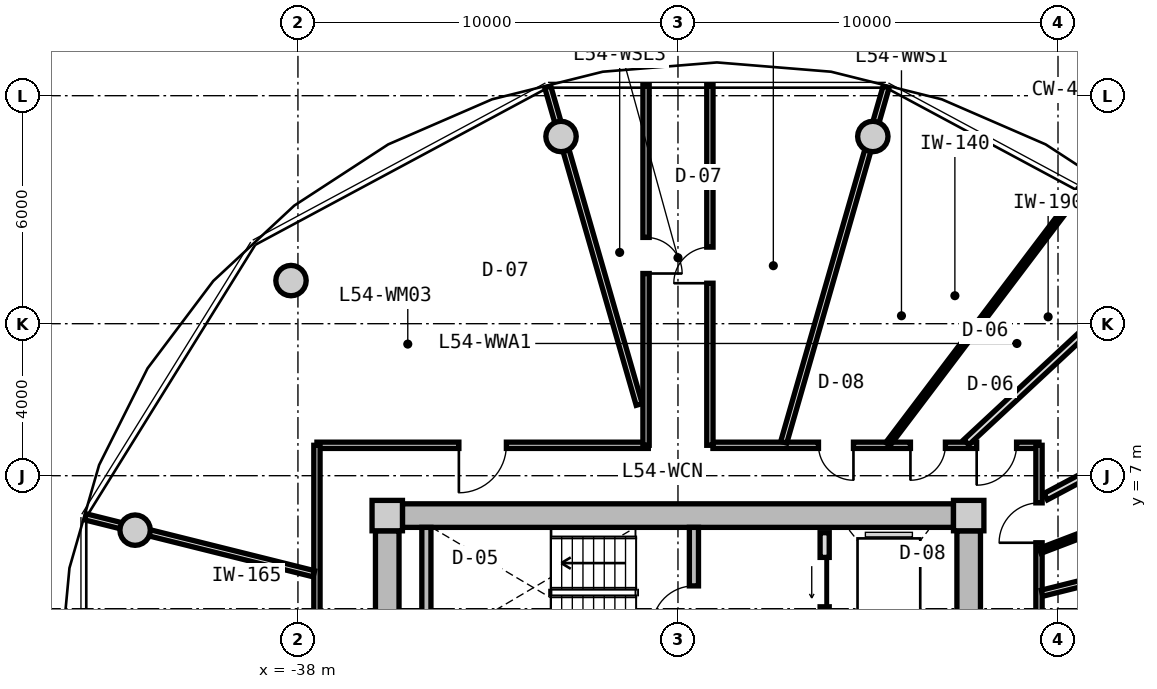
"""IFC4 building model, lengths in metres.
Left out: names, types, materials, properties, quantities, classifications, styles, units other than length and angle.
Written with IfcOpenShell. Run it as: python <this file> out.ifc"""

import sys

from ifc_helpers import new_model, si_unit, direction, frame, frame_2d, origin, origin_2d, place, context, subcontext, project, spatial, rectangle, circle, extrude, source, transform, mapped, element, fill, save


model = new_model("IFC4")
c1 = context("Model", 3, precision=1e-05, world=origin(), true_north=direction((0.0, 1.0)))
c2 = subcontext(c1, "Body", "Model", "MODEL_VIEW")
j1 = project(units=[si_unit("LENGTHUNIT", "METRE"), si_unit("PLANEANGLEUNIT", "RADIAN")], contexts=[c1])
p1 = place(None, origin())
s1 = spatial("IfcSite", under=j1, at=p1, CompositionType="ELEMENT")
p2 = place(p1, origin())
s2 = spatial("IfcBuilding", under=s1, at=p2, CompositionType="ELEMENT")
p3 = place(p2, frame((0.0, 0.0, 173.95)))
s3 = spatial("IfcBuildingStorey", under=s2, at=p3, CompositionType="ELEMENT", Elevation=173.95)
m1 = source(origin(), c2, "Body", "SweptSolid", [
    extrude(rectangle(XDim=0.8, YDim=0.8, at=origin_2d()), origin(), (0.0, 0.0, 1.0), 3.05),
])
for number, where, z_axis, x_axis in (
    (1, (-20.35, 5.95, 0.0), (0.0, 0.0, 1.0), (1.0, 0.0, 0.0)),
    (2, (-35.65, 5.95, 0.0), (0.0, 0.0, 1.0), (1.0, 0.0, 0.0)),
):
    element("IfcColumn", number, at=place(p3, frame(where, z_axis=z_axis, x_axis=x_axis)), inside=s3, PredefinedType="COLUMN", context=c2, shape_type="MappedRepresentation", body=[
        mapped(m1, transform((0.0, 0.0, 0.0), x_axis=(1.0, 0.0, 0.0), y_axis=(0.0, 1.0, 0.0), z_axis=(0.0, 0.0, 1.0), scale=1.0)),
    ])
m2 = source(origin(), c2, "Body", "SweptSolid", [
    extrude(rectangle(XDim=14.5, YDim=0.62, at=frame_2d((7.25, 0.0))), origin(), (0.0, 0.0, 1.0), 2.81),
])
p4 = place(p3, frame((-35.25, 5.95, 0.0), z_axis=(0.0, 0.0, 1.0), x_axis=(1.0, 0.0, 0.0)))
e3 = element("IfcWall", 3, at=p4, inside=s3, PredefinedType="SHEAR", context=c2, shape_type="MappedRepresentation", body=[
    mapped(m2, transform((0.0, 0.0, 0.0), x_axis=(1.0, 0.0, 0.0), y_axis=(0.0, 1.0, 0.0), z_axis=(0.0, 0.0, 1.0), scale=1.0)),
])
m3 = source(origin(), c2, "Body", "SweptSolid", [
    extrude(rectangle(XDim=11.1, YDim=0.62, at=frame_2d((5.55, 0.0))), origin(), (0.0, 0.0, 1.0), 2.81),
])
p5 = place(p3, frame((-35.65, -5.55, 0.0), z_axis=(0.0, 0.0, 1.0), x_axis=(0.0, 1.0, 0.0)))
e4 = element("IfcWall", 4, at=p5, inside=s3, PredefinedType="SHEAR", context=c2, shape_type="MappedRepresentation", body=[
    mapped(m3, transform((0.0, 0.0, 0.0), x_axis=(1.0, 0.0, 0.0), y_axis=(0.0, 1.0, 0.0), z_axis=(0.0, 0.0, 1.0), scale=1.0)),
])
p6 = place(p5, frame((3.8, 0.0, 0.0)))
e5 = element("IfcOpeningElement", 5, at=p6, cuts=e4, PredefinedType="OPENING", context=c2, shape_type="SweptSolid", body=[
    extrude(rectangle(XDim=1.2, YDim=2.15, at=frame_2d((0.6, 1.075))), frame((0.0, 0.32, 0.0), z_axis=(0.0, -1.0, 0.0), x_axis=(1.0, 0.0, 0.0)), (0.0, 0.0, 1.0), 0.64),
])
p7 = place(p3, frame((-20.35, 5.55, 0.0), z_axis=(0.0, 0.0, 1.0), x_axis=(0.0, -1.0, 0.0)))
e6 = element("IfcWall", 6, at=p7, inside=s3, PredefinedType="SHEAR", context=c2, shape_type="MappedRepresentation", body=[
    mapped(m3, transform((0.0, 0.0, 0.0), x_axis=(1.0, 0.0, 0.0), y_axis=(0.0, 1.0, 0.0), z_axis=(0.0, 0.0, 1.0), scale=1.0)),
])
p8 = place(p7, frame((5.65, 0.0, 0.0)))
e7 = element("IfcOpeningElement", 7, at=p8, cuts=e6, PredefinedType="OPENING", context=c2, shape_type="SweptSolid", body=[
    extrude(rectangle(XDim=1.2, YDim=2.15, at=frame_2d((0.6, 1.075))), frame((0.0, 0.32, 0.0), z_axis=(0.0, -1.0, 0.0), x_axis=(1.0, 0.0, 0.0)), (0.0, 0.0, 1.0), 0.64),
])
m4 = source(origin(), c2, "Body", "SweptSolid", [
    extrude(circle(Radius=0.4, at=origin_2d()), origin(), (0.0, 0.0, 1.0), 3.05),
])
for number, where, z_axis, x_axis in (
    (8, (-22.873, 15.926, 0.0), (0.0, 0.0, 1.0), (1.0, 0.0, 0.0)),
    (9, (-31.077, 15.926, 0.0), (0.0, 0.0, 1.0), (1.0, 0.0, 0.0)),
    (10, (-38.183, 12.135, 0.0), (0.0, 0.0, 1.0), (1.0, 0.0, 0.0)),
    (11, (-42.285, 5.567, 0.0), (0.0, 0.0, 1.0), (1.0, 0.0, 0.0)),
):
    element("IfcColumn", number, at=place(p3, frame(where, z_axis=z_axis, x_axis=x_axis)), inside=s3, PredefinedType="COLUMN", context=c2, shape_type="MappedRepresentation", body=[
        mapped(m4, transform((0.0, 0.0, 0.0), x_axis=(1.0, 0.0, 0.0), y_axis=(0.0, 1.0, 0.0), z_axis=(0.0, 0.0, 1.0), scale=1.0)),
    ])
m5 = source(origin(), c2, "Body", "SweptSolid", [
    extrude(rectangle(XDim=3.19, YDim=0.24, at=frame_2d((1.595, 0.0))), origin(), (0.0, 0.0, 1.0), 2.81),
])
p9 = place(p3, frame((-34.62, 2.45, 0.0), z_axis=(0.0, 0.0, 1.0), x_axis=(0.0, 1.0, 0.0)))
e12 = element("IfcWall", 12, at=p9, inside=s3, PredefinedType="PARTITIONING", context=c2, shape_type="MappedRepresentation", body=[
    mapped(m5, transform((0.0, 0.0, 0.0), x_axis=(1.0, 0.0, 0.0), y_axis=(0.0, 1.0, 0.0), z_axis=(0.0, 0.0, 1.0), scale=1.0)),
])
p10 = place(p3, frame((-27.58, 2.45, 0.0), z_axis=(0.0, 0.0, 1.0), x_axis=(0.0, 1.0, 0.0)))
e13 = element("IfcWall", 13, at=p10, inside=s3, PredefinedType="PARTITIONING", context=c2, shape_type="MappedRepresentation", body=[
    mapped(m5, transform((0.0, 0.0, 0.0), x_axis=(1.0, 0.0, 0.0), y_axis=(0.0, 1.0, 0.0), z_axis=(0.0, 0.0, 1.0), scale=1.0)),
])
p11 = place(p10, frame((0.55, 0.0, 0.0)))
e14 = element("IfcOpeningElement", 14, at=p11, cuts=e13, PredefinedType="OPENING", context=c2, shape_type="SweptSolid", body=[
    extrude(rectangle(XDim=1.1, YDim=2.15, at=frame_2d((0.55, 1.075))), frame((0.0, 0.13, 0.0), z_axis=(0.0, -1.0, 0.0), x_axis=(1.0, 0.0, 0.0)), (0.0, 0.0, 1.0), 0.26),
])
m6 = source(origin(), c2, "Body", "SweptSolid", [
    extrude(rectangle(XDim=5.0, YDim=0.24, at=frame_2d((2.5, 0.0))), origin(), (0.0, 0.0, 1.0), 2.795),
])
p12 = place(p3, frame((-24.14, 0.5, 0.0), z_axis=(0.0, 0.0, 1.0), x_axis=(0.0, 1.0, 0.0)))
e15 = element("IfcWall", 15, at=p12, inside=s3, PredefinedType="PARTITIONING", context=c2, shape_type="MappedRepresentation", body=[
    mapped(m6, transform((0.0, 0.0, 0.0), x_axis=(1.0, 0.0, 0.0), y_axis=(0.0, 1.0, 0.0), z_axis=(0.0, 0.0, 1.0), scale=1.0)),
])
p13 = place(p12, frame((3.05, 0.0, 0.0)))
e16 = element("IfcOpeningElement", 16, at=p13, cuts=e15, PredefinedType="OPENING", context=c2, shape_type="SweptSolid", body=[
    extrude(rectangle(XDim=1.3, YDim=2.2, at=frame_2d((0.65, 1.1))), frame((0.0, 0.13, 0.0), z_axis=(0.0, -1.0, 0.0), x_axis=(1.0, 0.0, 0.0)), (0.0, 0.0, 1.0), 0.26),
])
p14 = place(p12, frame((0.55, 0.0, 0.0)))
e17 = element("IfcOpeningElement", 17, at=p14, cuts=e15, PredefinedType="OPENING", context=c2, shape_type="SweptSolid", body=[
    extrude(rectangle(XDim=1.3, YDim=2.2, at=frame_2d((0.65, 1.1))), frame((0.0, 0.13, 0.0), z_axis=(0.0, -1.0, 0.0), x_axis=(1.0, 0.0, 0.0)), (0.0, 0.0, 1.0), 0.26),
])
m7 = source(origin(), c2, "Body", "SweptSolid", [
    extrude(rectangle(XDim=8.719, YDim=0.165, at=frame_2d((4.36, 0.0))), origin(), (0.0, 0.0, 1.0), 2.795),
])
p15 = place(p3, frame((-37.5, 7.8, 0.0), z_axis=(0.0, 0.0, 1.0), x_axis=(1.0, 0.0, 0.0)))
e18 = element("IfcWall", 18, at=p15, inside=s3, PredefinedType="PARTITIONING", context=c2, shape_type="MappedRepresentation", body=[
    mapped(m7, transform((0.0, 0.0, 0.0), x_axis=(1.0, 0.0, 0.0), y_axis=(0.0, 1.0, 0.0), z_axis=(0.0, 0.0, 1.0), scale=1.0)),
])
p16 = place(p15, frame((3.735, 0.0, 0.0)))
e19 = element("IfcOpeningElement", 19, at=p16, cuts=e18, PredefinedType="OPENING", context=c2, shape_type="SweptSolid", body=[
    extrude(rectangle(XDim=1.25, YDim=2.2, at=frame_2d((0.625, 1.1))), frame((0.0, 0.093, 0.0), z_axis=(0.0, -1.0, 0.0), x_axis=(1.0, 0.0, 0.0)), (0.0, 0.0, 1.0), 0.185),
])
m8 = source(origin(), c2, "Body", "SweptSolid", [
    extrude(rectangle(XDim=8.58, YDim=0.165, at=frame_2d((4.29, 0.0))), origin(), (0.0, 0.0, 1.0), 2.795),
])
p17 = place(p3, frame((-27.08, 7.8, 0.0), z_axis=(0.0, 0.0, 1.0), x_axis=(1.0, 0.0, 0.0)))
e20 = element("IfcWall", 20, at=p17, inside=s3, PredefinedType="PARTITIONING", context=c2, shape_type="MappedRepresentation", body=[
    mapped(m8, transform((0.0, 0.0, 0.0), x_axis=(1.0, 0.0, 0.0), y_axis=(0.0, 1.0, 0.0), z_axis=(0.0, 0.0, 1.0), scale=1.0)),
])
p18 = place(p17, frame((6.94, 0.0, 0.0)))
e21 = element("IfcOpeningElement", 21, at=p18, cuts=e20, PredefinedType="OPENING", context=c2, shape_type="SweptSolid", body=[
    extrude(rectangle(XDim=1.05, YDim=2.15, at=frame_2d((0.525, 1.075))), frame((0.0, 0.093, 0.0), z_axis=(0.0, -1.0, 0.0), x_axis=(1.0, 0.0, 0.0)), (0.0, 0.0, 1.0), 0.185),
])
p19 = place(p17, frame((5.197, 0.0, 0.0)))
e22 = element("IfcOpeningElement", 22, at=p19, cuts=e20, PredefinedType="OPENING", context=c2, shape_type="SweptSolid", body=[
    extrude(rectangle(XDim=0.92, YDim=2.1, at=frame_2d((0.46, 1.05))), frame((0.0, 0.093, 0.0), z_axis=(0.0, -1.0, 0.0), x_axis=(1.0, 0.0, 0.0)), (0.0, 0.0, 1.0), 0.185),
])
p20 = place(p17, frame((2.778, 0.0, 0.0)))
e23 = element("IfcOpeningElement", 23, at=p20, cuts=e20, PredefinedType="OPENING", context=c2, shape_type="SweptSolid", body=[
    extrude(rectangle(XDim=0.92, YDim=2.1, at=frame_2d((0.46, 1.05))), frame((0.0, 0.093, 0.0), z_axis=(0.0, -1.0, 0.0), x_axis=(1.0, 0.0, 0.0)), (0.0, 0.0, 1.0), 0.185),
])
m9 = source(origin(), c2, "Body", "SweptSolid", [
    extrude(rectangle(XDim=6.88, YDim=0.165, at=frame_2d((3.44, 0.0))), origin(), (0.0, 0.0, 1.0), 2.795),
])
p21 = place(p3, frame((-37.5, 0.92, 0.0), z_axis=(0.0, 0.0, 1.0), x_axis=(0.0, 1.0, 0.0)))
e24 = element("IfcWall", 24, at=p21, inside=s3, PredefinedType="PARTITIONING", context=c2, shape_type="MappedRepresentation", body=[
    mapped(m9, transform((0.0, 0.0, 0.0), x_axis=(1.0, 0.0, 0.0), y_axis=(0.0, 1.0, 0.0), z_axis=(0.0, 0.0, 1.0), scale=1.0)),
])
p22 = place(p3, frame((-18.5, 7.8, 0.0), z_axis=(0.0, 0.0, 1.0), x_axis=(0.0, -1.0, 0.0)))
e25 = element("IfcWall", 25, at=p22, inside=s3, PredefinedType="PARTITIONING", context=c2, shape_type="MappedRepresentation", body=[
    mapped(m9, transform((0.0, 0.0, 0.0), x_axis=(1.0, 0.0, 0.0), y_axis=(0.0, 1.0, 0.0), z_axis=(0.0, 0.0, 1.0), scale=1.0)),
])
p23 = place(p22, frame((1.515, 0.0, 0.0)))
e26 = element("IfcOpeningElement", 26, at=p23, cuts=e25, PredefinedType="OPENING", context=c2, shape_type="SweptSolid", body=[
    extrude(rectangle(XDim=1.05, YDim=2.15, at=frame_2d((0.525, 1.075))), frame((0.0, 0.093, 0.0), z_axis=(0.0, -1.0, 0.0), x_axis=(1.0, 0.0, 0.0)), (0.0, 0.0, 1.0), 0.185),
])
m10 = source(origin(), c2, "Body", "SweptSolid", [
    extrude(rectangle(XDim=9.73, YDim=0.165, at=frame_2d((4.865, 0.0))), origin(), (0.0, 0.0, 1.0), 2.345),
])
p24 = place(p3, frame((-25.217, 7.88, 0.0), z_axis=(0.0, 0.0, 1.0), x_axis=(0.27679492614, 0.960929013436, 0.0)))
e27 = element("IfcWall", 27, at=p24, inside=s3, PredefinedType="PARTITIONING", context=c2, shape_type="MappedRepresentation", body=[
    mapped(m10, transform((0.0, 0.0, 0.0), x_axis=(1.0, 0.0, 0.0), y_axis=(0.0, 1.0, 0.0), z_axis=(0.0, 0.0, 1.0), scale=1.0)),
])
m11 = source(origin(), c2, "Body", "SweptSolid", [
    extrude(rectangle(XDim=8.695, YDim=0.165, at=frame_2d((4.348, 0.0))), origin(), (0.0, 0.0, 1.0), 2.345),
])
p25 = place(p3, frame((-29.02, 8.875, 0.0), z_axis=(0.0, 0.0, 1.0), x_axis=(-0.276797231892, 0.960928349263, 0.0)))
e28 = element("IfcWall", 28, at=p25, inside=s3, PredefinedType="PARTITIONING", context=c2, shape_type="MappedRepresentation", body=[
    mapped(m11, transform((0.0, 0.0, 0.0), x_axis=(1.0, 0.0, 0.0), y_axis=(0.0, 1.0, 0.0), z_axis=(0.0, 0.0, 1.0), scale=1.0)),
])
m12 = source(origin(), c2, "Body", "SweptSolid", [
    extrude(rectangle(XDim=6.193, YDim=0.165, at=frame_2d((3.096, 0.0))), origin(), (0.0, 0.0, 1.0), 2.345),
])
p26 = place(p3, frame((-37.58, 4.419, 0.0), z_axis=(0.0, 0.0, 1.0), x_axis=(-0.970309243466, 0.241867674657, 0.0)))
e29 = element("IfcWall", 29, at=p26, inside=s3, PredefinedType="PARTITIONING", context=c2, shape_type="MappedRepresentation", body=[
    mapped(m12, transform((0.0, 0.0, 0.0), x_axis=(1.0, 0.0, 0.0), y_axis=(0.0, 1.0, 0.0), z_axis=(0.0, 0.0, 1.0), scale=1.0)),
])
m13 = source(origin(), c2, "Body", "SweptSolid", [
    extrude(rectangle(XDim=8.305, YDim=0.165, at=frame_2d((4.153, 0.0))), origin(), (0.0, 0.0, 1.0), 2.345),
])
p27 = place(p3, frame((-18.42, 3.908, 0.0), z_axis=(0.0, 0.0, 1.0), x_axis=(0.970309994378, 0.241864662175, 0.0)))
e30 = element("IfcWall", 30, at=p27, inside=s3, PredefinedType="PARTITIONING", context=c2, shape_type="MappedRepresentation", body=[
    mapped(m13, transform((0.0, 0.0, 0.0), x_axis=(1.0, 0.0, 0.0), y_axis=(0.0, 1.0, 0.0), z_axis=(0.0, 0.0, 1.0), scale=1.0)),
])
m14 = source(origin(), c2, "Body", "SweptSolid", [
    extrude(rectangle(XDim=9.48, YDim=0.165, at=frame_2d((4.74, 0.0))), origin(), (0.0, 0.0, 1.0), 2.795),
])
p28 = place(p3, frame((-28.84, 7.8, 0.0), z_axis=(0.0, 0.0, 1.0), x_axis=(0.0, 1.0, 0.0)))
e31 = element("IfcWall", 31, at=p28, inside=s3, PredefinedType="PARTITIONING", context=c2, shape_type="MappedRepresentation", body=[
    mapped(m14, transform((0.0, 0.0, 0.0), x_axis=(1.0, 0.0, 0.0), y_axis=(0.0, 1.0, 0.0), z_axis=(0.0, 0.0, 1.0), scale=1.0)),
])
p29 = place(p28, frame((4.521, 0.0, 0.0)))
e32 = element("IfcOpeningElement", 32, at=p29, cuts=e31, PredefinedType="OPENING", context=c2, shape_type="SweptSolid", body=[
    extrude(rectangle(XDim=0.95, YDim=2.1, at=frame_2d((0.475, 1.05))), frame((0.0, 0.093, 0.0), z_axis=(0.0, -1.0, 0.0), x_axis=(1.0, 0.0, 0.0)), (0.0, 0.0, 1.0), 0.185),
])
p30 = place(p3, frame((-27.16, 17.28, 0.0), z_axis=(0.0, 0.0, 1.0), x_axis=(0.0, -1.0, 0.0)))
e33 = element("IfcWall", 33, at=p30, inside=s3, PredefinedType="PARTITIONING", context=c2, shape_type="MappedRepresentation", body=[
    mapped(m14, transform((0.0, 0.0, 0.0), x_axis=(1.0, 0.0, 0.0), y_axis=(0.0, 1.0, 0.0), z_axis=(0.0, 0.0, 1.0), scale=1.0)),
])
p31 = place(p30, frame((4.265, 0.0, 0.0)))
e34 = element("IfcOpeningElement", 34, at=p31, cuts=e33, PredefinedType="OPENING", context=c2, shape_type="SweptSolid", body=[
    extrude(rectangle(XDim=0.95, YDim=2.1, at=frame_2d((0.475, 1.05))), frame((0.0, 0.093, 0.0), z_axis=(0.0, -1.0, 0.0), x_axis=(1.0, 0.0, 0.0)), (0.0, 0.0, 1.0), 0.185),
])
m15 = source(origin(), c2, "Body", "SweptSolid", [
    extrude(rectangle(XDim=7.648, YDim=0.19, at=frame_2d((3.824, 0.0))), origin(), (0.0, 0.0, 1.0), 2.345),
])
p32 = place(p3, frame((-20.413, 7.88, 0.0), z_axis=(0.0, 0.0, 1.0), x_axis=(0.732182665826, 0.681108320213, 0.0)))
e35 = element("IfcWall", 35, at=p32, inside=s3, PredefinedType="PARTITIONING", context=c2, shape_type="MappedRepresentation", body=[
    mapped(m15, transform((0.0, 0.0, 0.0), x_axis=(1.0, 0.0, 0.0), y_axis=(0.0, 1.0, 0.0), z_axis=(0.0, 0.0, 1.0), scale=1.0)),
])
m16 = source(origin(), c2, "Body", "SweptSolid", [
    extrude(rectangle(XDim=6.499, YDim=0.19, at=frame_2d((3.25, 0.0))), origin(), (0.0, 0.0, 1.0), 2.795),
])
p33 = place(p3, frame((-18.324, 6.449, 0.0), z_axis=(0.0, 0.0, 1.0), x_axis=(0.882715595921, 0.469907625729, 0.0)))
e36 = element("IfcWall", 36, at=p33, inside=s3, PredefinedType="PARTITIONING", context=c2, shape_type="MappedRepresentation", body=[
    mapped(m16, transform((0.0, 0.0, 0.0), x_axis=(1.0, 0.0, 0.0), y_axis=(0.0, 1.0, 0.0), z_axis=(0.0, 0.0, 1.0), scale=1.0)),
])
m17 = source(origin(), c2, "Body", "SweptSolid", [
    extrude(rectangle(XDim=3.295, YDim=0.14, at=frame_2d((1.647, 0.0))), origin(), (0.0, 0.0, 1.0), 2.795),
])
p34 = place(p3, frame((-18.47, 5.023, 0.0), z_axis=(0.0, 0.0, 1.0), x_axis=(0.934202224769, 0.356743890258, 0.0)))
e37 = element("IfcWall", 37, at=p34, inside=s3, PredefinedType="PARTITIONING", context=c2, shape_type="MappedRepresentation", body=[
    mapped(m17, transform((0.0, 0.0, 0.0), x_axis=(1.0, 0.0, 0.0), y_axis=(0.0, 1.0, 0.0), z_axis=(0.0, 0.0, 1.0), scale=1.0)),
])
p35 = place(p34, frame((1.188, 0.0, 0.0)))
e38 = element("IfcOpeningElement", 38, at=p35, cuts=e37, PredefinedType="OPENING", context=c2, shape_type="SweptSolid", body=[
    extrude(rectangle(XDim=0.92, YDim=2.1, at=frame_2d((0.46, 1.05))), frame((0.0, 0.08, 0.0), z_axis=(0.0, -1.0, 0.0), x_axis=(1.0, 0.0, 0.0)), (0.0, 0.0, 1.0), 0.16),
])
m18 = source(origin(), c2, "Body", "SweptSolid", [
    extrude(rectangle(XDim=8.359, YDim=0.14, at=frame_2d((4.18, 0.0))), origin(), (0.0, 0.0, 1.0), 2.795),
])
p36 = place(p3, frame((-22.477, 7.83, 0.0), z_axis=(0.0, 0.0, 1.0), x_axis=(0.603265985309, 0.797540062297, 0.0)))
e39 = element("IfcWall", 39, at=p36, inside=s3, PredefinedType="PARTITIONING", context=c2, shape_type="MappedRepresentation", body=[
    mapped(m18, transform((0.0, 0.0, 0.0), x_axis=(1.0, 0.0, 0.0), y_axis=(0.0, 1.0, 0.0), z_axis=(0.0, 0.0, 1.0), scale=1.0)),
])
m19 = source(origin(), c2, "Body", "SweptSolid", [
    extrude(rectangle(XDim=1.1, YDim=2.15, at=frame_2d((0.55, 1.075))), frame((0.0, 0.025, 0.0), z_axis=(0.0, -1.0, 0.0), x_axis=(1.0, 0.0, 0.0)), (0.0, 0.0, 1.0), 0.05),
])
p37 = place(p11, origin())
e40 = element("IfcDoor", 40, at=p37, inside=s3, OperationType="SINGLE_SWING_LEFT", PredefinedType="DOOR", context=c2, shape_type="MappedRepresentation", body=[
    mapped(m19, transform((0.0, 0.0, 0.0), x_axis=(1.0, 0.0, 0.0), y_axis=(0.0, 1.0, 0.0), z_axis=(0.0, 0.0, 1.0), scale=1.0)),
])
fill(e14, e40)
m20 = source(origin(), c2, "Body", "SweptSolid", [
    extrude(rectangle(XDim=1.3, YDim=2.2, at=frame_2d((0.65, 1.1))), frame((0.0, 0.025, 0.0), z_axis=(0.0, -1.0, 0.0), x_axis=(1.0, 0.0, 0.0)), (0.0, 0.0, 1.0), 0.05),
])
p38 = place(p13, origin())
e41 = element("IfcDoor", 41, at=p38, inside=s3, OperationType="SLIDING_TO_LEFT", PredefinedType="DOOR", context=c2, shape_type="MappedRepresentation", body=[
    mapped(m20, transform((0.0, 0.0, 0.0), x_axis=(1.0, 0.0, 0.0), y_axis=(0.0, 1.0, 0.0), z_axis=(0.0, 0.0, 1.0), scale=1.0)),
])
fill(e16, e41)
m21 = source(origin(), c2, "Body", "SweptSolid", [
    extrude(rectangle(XDim=0.95, YDim=2.1, at=frame_2d((0.475, 1.05))), frame((0.0, 0.025, 0.0), z_axis=(0.0, -1.0, 0.0), x_axis=(1.0, 0.0, 0.0)), (0.0, 0.0, 1.0), 0.05),
])
p39 = place(p29, frame((0.95, 0.0, 0.0), z_axis=(0.0, 0.0, 1.0), x_axis=(-1.0, 0.0, 0.0)))
e42 = element("IfcDoor", 42, at=p39, inside=s3, OperationType="SINGLE_SWING_RIGHT", PredefinedType="DOOR", context=c2, shape_type="MappedRepresentation", body=[
    mapped(m21, transform((0.0, 0.0, 0.0), x_axis=(1.0, 0.0, 0.0), y_axis=(0.0, 1.0, 0.0), z_axis=(0.0, 0.0, 1.0), scale=1.0)),
])
fill(e32, e42)
p40 = place(p31, frame((0.95, 0.0, 0.0), z_axis=(0.0, 0.0, 1.0), x_axis=(-1.0, 0.0, 0.0)))
e43 = element("IfcDoor", 43, at=p40, inside=s3, OperationType="SINGLE_SWING_LEFT", PredefinedType="DOOR", context=c2, shape_type="MappedRepresentation", body=[
    mapped(m21, transform((0.0, 0.0, 0.0), x_axis=(1.0, 0.0, 0.0), y_axis=(0.0, 1.0, 0.0), z_axis=(0.0, 0.0, 1.0), scale=1.0)),
])
fill(e34, e43)
m22 = source(origin(), c2, "Body", "SweptSolid", [
    extrude(rectangle(XDim=1.05, YDim=2.15, at=frame_2d((0.525, 1.075))), frame((0.0, 0.025, 0.0), z_axis=(0.0, -1.0, 0.0), x_axis=(1.0, 0.0, 0.0)), (0.0, 0.0, 1.0), 0.05),
])
p41 = place(p23, frame((1.05, 0.0, 0.0), z_axis=(0.0, 0.0, 1.0), x_axis=(-1.0, 0.0, 0.0)))
e44 = element("IfcDoor", 44, at=p41, inside=s3, OperationType="SINGLE_SWING_LEFT", PredefinedType="DOOR", context=c2, shape_type="MappedRepresentation", body=[
    mapped(m22, transform((0.0, 0.0, 0.0), x_axis=(1.0, 0.0, 0.0), y_axis=(0.0, 1.0, 0.0), z_axis=(0.0, 0.0, 1.0), scale=1.0)),
])
fill(e26, e44)
p42 = place(p18, frame((1.05, 0.0, 0.0), z_axis=(0.0, 0.0, 1.0), x_axis=(-1.0, 0.0, 0.0)))
e45 = element("IfcDoor", 45, at=p42, inside=s3, OperationType="SINGLE_SWING_RIGHT", PredefinedType="DOOR", context=c2, shape_type="MappedRepresentation", body=[
    mapped(m22, transform((0.0, 0.0, 0.0), x_axis=(1.0, 0.0, 0.0), y_axis=(0.0, 1.0, 0.0), z_axis=(0.0, 0.0, 1.0), scale=1.0)),
])
fill(e21, e45)
m23 = source(origin(), c2, "Body", "SweptSolid", [
    extrude(rectangle(XDim=0.92, YDim=2.1, at=frame_2d((0.46, 1.05))), frame((0.0, 0.025, 0.0), z_axis=(0.0, -1.0, 0.0), x_axis=(1.0, 0.0, 0.0)), (0.0, 0.0, 1.0), 0.05),
])
p43 = place(p19, frame((0.92, 0.0, 0.0), z_axis=(0.0, 0.0, 1.0), x_axis=(-1.0, 0.0, 0.0)))
e46 = element("IfcDoor", 46, at=p43, inside=s3, OperationType="SINGLE_SWING_RIGHT", PredefinedType="DOOR", context=c2, shape_type="MappedRepresentation", body=[
    mapped(m23, transform((0.0, 0.0, 0.0), x_axis=(1.0, 0.0, 0.0), y_axis=(0.0, 1.0, 0.0), z_axis=(0.0, 0.0, 1.0), scale=1.0)),
])
fill(e22, e46)
p44 = place(p20, frame((0.92, 0.0, 0.0), z_axis=(0.0, 0.0, 1.0), x_axis=(-1.0, 0.0, 0.0)))
e47 = element("IfcDoor", 47, at=p44, inside=s3, OperationType="SINGLE_SWING_LEFT", PredefinedType="DOOR", context=c2, shape_type="MappedRepresentation", body=[
    mapped(m23, transform((0.0, 0.0, 0.0), x_axis=(1.0, 0.0, 0.0), y_axis=(0.0, 1.0, 0.0), z_axis=(0.0, 0.0, 1.0), scale=1.0)),
])
fill(e23, e47)
m24 = source(origin(), c2, "Body", "SweptSolid", [
    extrude(rectangle(XDim=1.25, YDim=2.2, at=frame_2d((0.625, 1.1))), frame((0.0, 0.025, 0.0), z_axis=(0.0, -1.0, 0.0), x_axis=(1.0, 0.0, 0.0)), (0.0, 0.0, 1.0), 0.05),
])
p45 = place(p16, frame((1.25, 0.0, 0.0), z_axis=(0.0, 0.0, 1.0), x_axis=(-1.0, 0.0, 0.0)))
e48 = element("IfcDoor", 48, at=p45, inside=s3, OperationType="SINGLE_SWING_RIGHT", PredefinedType="DOOR", context=c2, shape_type="MappedRepresentation", body=[
    mapped(m24, transform((0.0, 0.0, 0.0), x_axis=(1.0, 0.0, 0.0), y_axis=(0.0, 1.0, 0.0), z_axis=(0.0, 0.0, 1.0), scale=1.0)),
])
fill(e19, e48)
save(model, sys.argv[1])
